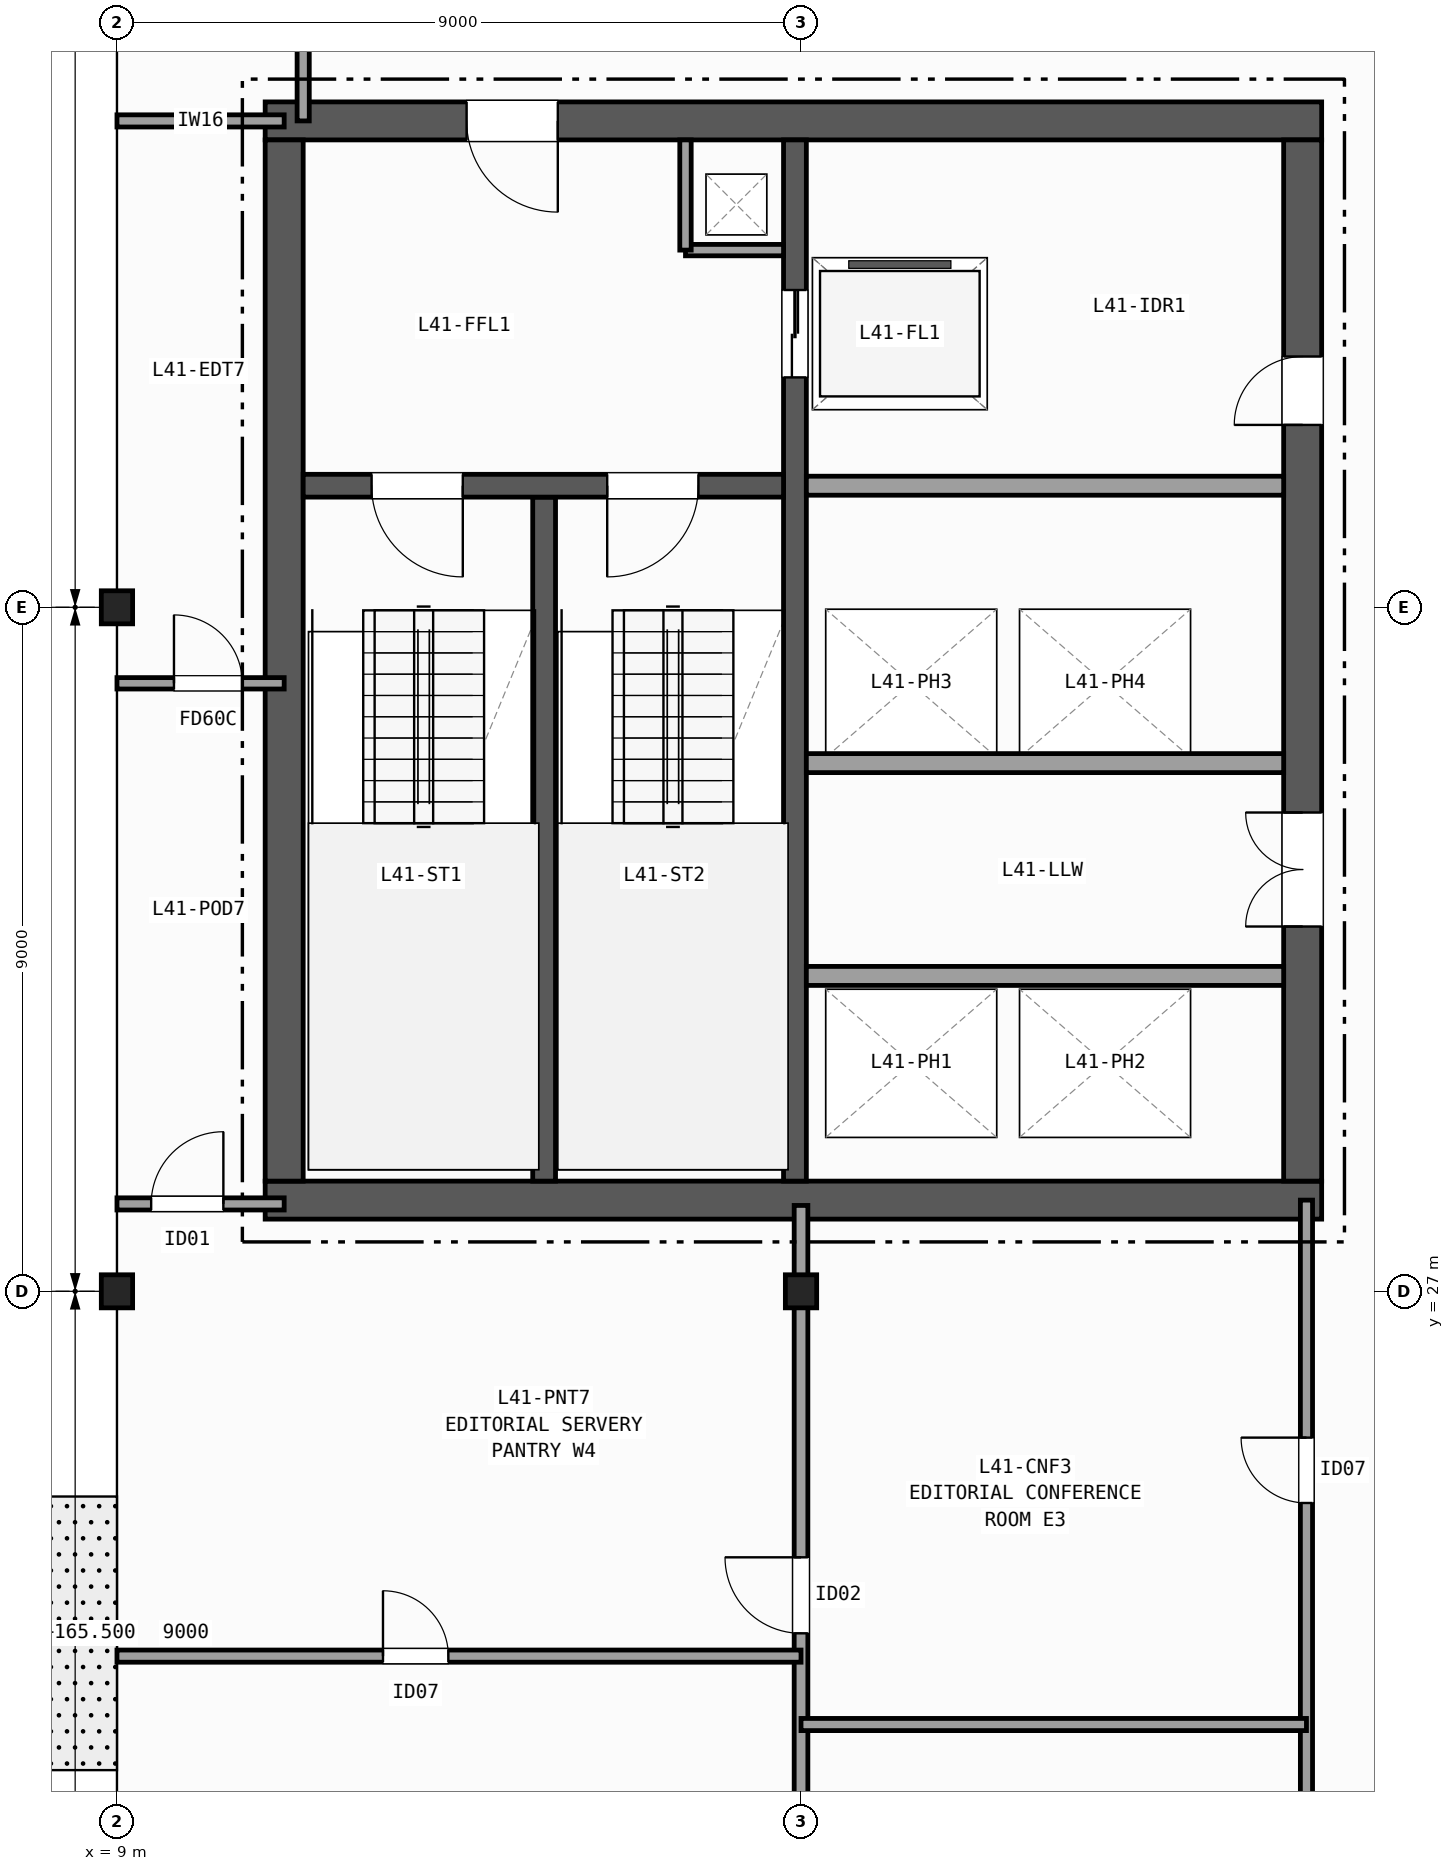
"""IFC4 building model, lengths in metres.
Left out: names, types, materials, properties, quantities, classifications, styles, units other than length and angle.
Written with IfcOpenShell. Run it as: python <this file> out.ifc"""

import sys

from ifc_helpers import new_model, si_unit, direction, frame, frame_2d, origin, origin_2d, place, context, subcontext, project, spatial, rectangle, i_section, extrude, element, fill, save


model = new_model("IFC4")
c1 = context("Model", 3, precision=1e-05, world=origin(), true_north=direction((0.0, 1.0)))
c2 = subcontext(c1, "Body", "Model", "MODEL_VIEW")
j1 = project(units=[si_unit("LENGTHUNIT", "METRE"), si_unit("PLANEANGLEUNIT", "RADIAN")], contexts=[c1])
p1 = place(None, origin())
s1 = spatial("IfcSite", under=j1, at=p1, CompositionType="ELEMENT")
p2 = place(p1, origin())
s2 = spatial("IfcBuilding", under=s1, at=p2, CompositionType="ELEMENT")
p3 = place(p2, frame((0.0, 0.0, 165.5)))
s3 = spatial("IfcBuildingStorey", under=s2, at=p3, CompositionType="ELEMENT", Elevation=165.5)
for number, where, z_axis, x_axis in (
    (1, (9.0, 27.0, 0.0), (0.0, 0.0, 1.0), (1.0, 0.0, 0.0)),
    (2, (9.0, 36.0, 0.0), (0.0, 0.0, 1.0), (1.0, 0.0, 0.0)),
    (3, (18.0, 27.0, 0.0), (0.0, 0.0, 1.0), (1.0, 0.0, 0.0)),
):
    element("IfcColumn", number, at=place(p3, frame(where, z_axis=z_axis, x_axis=x_axis)), inside=s3, PredefinedType="COLUMN", context=c2, shape_type="SweptSolid", body=[
        extrude(i_section(OverallWidth=0.412, OverallDepth=0.435, WebThickness=0.036, FlangeThickness=0.057, FilletRadius=0.015, at=origin_2d()), origin(), (0.0, 0.0, 1.0), 3.7),
    ])
p4 = place(p3, frame((10.95, 28.2, 0.0), z_axis=(0.0, 0.0, 1.0), x_axis=(1.0, 0.0, 0.0)))
e4 = element("IfcWall", 4, at=p4, inside=s3, PredefinedType="SHEAR", context=c2, shape_type="SweptSolid", body=[
    extrude(rectangle(XDim=13.9, YDim=0.5, at=frame_2d((6.95, 0.0))), origin(), (0.0, 0.0, 1.0), 3.37),
])
p5 = place(p3, frame((24.85, 42.4, 0.0), z_axis=(0.0, 0.0, 1.0), x_axis=(-1.0, 0.0, 0.0)))
e5 = element("IfcWall", 5, at=p5, inside=s3, PredefinedType="SHEAR", context=c2, shape_type="SweptSolid", body=[
    extrude(rectangle(XDim=13.9, YDim=0.5, at=frame_2d((6.95, 0.0))), origin(), (0.0, 0.0, 1.0), 3.37),
])
p6 = place(p5, frame((10.05, 0.0, 0.0)))
e6 = element("IfcOpeningElement", 6, at=p6, cuts=e5, PredefinedType="OPENING", context=c2, shape_type="SweptSolid", body=[
    extrude(rectangle(XDim=1.2, YDim=2.15, at=frame_2d((0.6, 1.075))), frame((0.0, 0.26, 0.0), z_axis=(0.0, -1.0, 0.0), x_axis=(1.0, 0.0, 0.0)), (0.0, 0.0, 1.0), 0.52),
])
p7 = place(p3, frame((11.2, 42.15, 0.0), z_axis=(0.0, 0.0, 1.0), x_axis=(0.0, -1.0, 0.0)))
e7 = element("IfcWall", 7, at=p7, inside=s3, PredefinedType="SHEAR", context=c2, shape_type="SweptSolid", body=[
    extrude(rectangle(XDim=13.7, YDim=0.5, at=frame_2d((6.85, 0.0))), origin(), (0.0, 0.0, 1.0), 3.37),
])
p8 = place(p3, frame((24.6, 28.45, 0.0), z_axis=(0.0, 0.0, 1.0), x_axis=(0.0, 1.0, 0.0)))
e8 = element("IfcWall", 8, at=p8, inside=s3, PredefinedType="SHEAR", context=c2, shape_type="SweptSolid", body=[
    extrude(rectangle(XDim=13.7, YDim=0.5, at=frame_2d((6.85, 0.0))), origin(), (0.0, 0.0, 1.0), 3.37),
])
p9 = place(p8, frame((3.35, 0.0, 0.0)))
e9 = element("IfcOpeningElement", 9, at=p9, cuts=e8, PredefinedType="OPENING", context=c2, shape_type="SweptSolid", body=[
    extrude(rectangle(XDim=1.5, YDim=2.2, at=frame_2d((0.75, 1.1))), frame((0.0, 0.26, 0.0), z_axis=(0.0, -1.0, 0.0), x_axis=(1.0, 0.0, 0.0)), (0.0, 0.0, 1.0), 0.52),
])
p10 = place(p8, frame((9.95, 0.0, 0.0)))
e10 = element("IfcOpeningElement", 10, at=p10, cuts=e8, PredefinedType="OPENING", context=c2, shape_type="SweptSolid", body=[
    extrude(rectangle(XDim=0.9, YDim=2.1, at=frame_2d((0.45, 1.05))), frame((0.0, 0.26, 0.0), z_axis=(0.0, -1.0, 0.0), x_axis=(1.0, 0.0, 0.0)), (0.0, 0.0, 1.0), 0.52),
])
p11 = place(p3, frame((14.62, 28.45, 0.0), z_axis=(0.0, 0.0, 1.0), x_axis=(0.0, 1.0, 0.0)))
e11 = element("IfcWall", 11, at=p11, inside=s3, PredefinedType="SHEAR", context=c2, shape_type="SweptSolid", body=[
    extrude(rectangle(XDim=9.0, YDim=0.3, at=frame_2d((4.5, 0.0))), origin(), (0.0, 0.0, 1.0), 3.37),
])
p12 = place(p3, frame((17.92, 42.15, 0.0), z_axis=(0.0, 0.0, 1.0), x_axis=(0.0, -1.0, 0.0)))
e12 = element("IfcWall", 12, at=p12, inside=s3, PredefinedType="SHEAR", context=c2, shape_type="SweptSolid", body=[
    extrude(rectangle(XDim=13.7, YDim=0.3, at=frame_2d((6.85, 0.0))), origin(), (0.0, 0.0, 1.0), 3.37),
])
p13 = place(p12, frame((1.975, 0.0, 0.0)))
e13 = element("IfcOpeningElement", 13, at=p13, cuts=e12, PredefinedType="OPENING", context=c2, shape_type="SweptSolid", body=[
    extrude(rectangle(XDim=1.15, YDim=2.15, at=frame_2d((0.575, 1.075))), frame((0.0, 0.16, 0.0), z_axis=(0.0, -1.0, 0.0), x_axis=(1.0, 0.0, 0.0)), (0.0, 0.0, 1.0), 0.32),
])
p14 = place(p3, frame((17.77, 37.6, 0.0), z_axis=(0.0, 0.0, 1.0), x_axis=(-1.0, 0.0, 0.0)))
e14 = element("IfcWall", 14, at=p14, inside=s3, PredefinedType="SHEAR", context=c2, shape_type="SweptSolid", body=[
    extrude(rectangle(XDim=6.32, YDim=0.3, at=frame_2d((3.16, 0.0))), origin(), (0.0, 0.0, 1.0), 3.37),
])
p15 = place(p14, frame((4.22, 0.0, 0.0)))
e15 = element("IfcOpeningElement", 15, at=p15, cuts=e14, PredefinedType="OPENING", context=c2, shape_type="SweptSolid", body=[
    extrude(rectangle(XDim=1.2, YDim=2.15, at=frame_2d((0.6, 1.075))), frame((0.0, 0.16, 0.0), z_axis=(0.0, -1.0, 0.0), x_axis=(1.0, 0.0, 0.0)), (0.0, 0.0, 1.0), 0.32),
])
p16 = place(p14, frame((1.12, 0.0, 0.0)))
e16 = element("IfcOpeningElement", 16, at=p16, cuts=e14, PredefinedType="OPENING", context=c2, shape_type="SweptSolid", body=[
    extrude(rectangle(XDim=1.2, YDim=2.15, at=frame_2d((0.6, 1.075))), frame((0.0, 0.16, 0.0), z_axis=(0.0, -1.0, 0.0), x_axis=(1.0, 0.0, 0.0)), (0.0, 0.0, 1.0), 0.32),
])
p17 = place(p3, frame((16.48, 40.7, 0.0), z_axis=(0.0, 0.0, 1.0), x_axis=(1.0, 0.0, 0.0)))
e17 = element("IfcWall", 17, at=p17, inside=s3, PredefinedType="PARTITIONING", context=c2, shape_type="SweptSolid", body=[
    extrude(rectangle(XDim=1.29, YDim=0.15, at=frame_2d((0.645, 0.0))), origin(), (0.0, 0.0, 1.0), 3.37),
])
p18 = place(p3, frame((16.48, 40.7, 0.0), z_axis=(0.0, 0.0, 1.0), x_axis=(0.0, 1.0, 0.0)))
e18 = element("IfcWall", 18, at=p18, inside=s3, PredefinedType="PARTITIONING", context=c2, shape_type="SweptSolid", body=[
    extrude(rectangle(XDim=1.45, YDim=0.15, at=frame_2d((0.725, 0.0))), origin(), (0.0, 0.0, 1.0), 3.37),
])
for number, where, z_axis, x_axis in (
    (19, (18.07, 37.6, 0.0), (0.0, 0.0, 1.0), (1.0, 0.0, 0.0)),
    (20, (18.07, 31.15, 0.0), (0.0, 0.0, 1.0), (1.0, 0.0, 0.0)),
    (21, (24.35, 33.95, 0.0), (0.0, 0.0, 1.0), (-1.0, 0.0, 0.0)),
):
    element("IfcWall", number, at=place(p3, frame(where, z_axis=z_axis, x_axis=x_axis)), inside=s3, PredefinedType="PARTITIONING", context=c2, shape_type="SweptSolid", body=[
        extrude(rectangle(XDim=6.28, YDim=0.25, at=frame_2d((3.14, 0.0))), origin(), (0.0, 0.0, 1.0), 3.37),
    ])
p19 = place(p3, frame((9.0, 28.15, 0.0), z_axis=(0.0, 0.0, 1.0), x_axis=(1.0, 0.0, 0.0)))
e22 = element("IfcWall", 22, at=p19, inside=s3, PredefinedType="PARTITIONING", context=c2, shape_type="SweptSolid", body=[
    extrude(rectangle(XDim=2.2, YDim=0.16, at=frame_2d((1.1, 0.0))), origin(), (0.0, 0.0, 1.0), 2.584),
])
p20 = place(p19, frame((0.45, 0.0, 0.0)))
e23 = element("IfcOpeningElement", 23, at=p20, cuts=e22, PredefinedType="OPENING", context=c2, shape_type="SweptSolid", body=[
    extrude(rectangle(XDim=0.95, YDim=2.1, at=frame_2d((0.475, 1.05))), frame((0.0, 0.09, 0.0), z_axis=(0.0, -1.0, 0.0), x_axis=(1.0, 0.0, 0.0)), (0.0, 0.0, 1.0), 0.18),
])
p21 = place(p3, frame((9.0, 42.4, 0.0), z_axis=(0.0, 0.0, 1.0), x_axis=(1.0, 0.0, 0.0)))
e24 = element("IfcWall", 24, at=p21, inside=s3, PredefinedType="PARTITIONING", context=c2, shape_type="SweptSolid", body=[
    extrude(rectangle(XDim=2.2, YDim=0.16, at=frame_2d((1.1, 0.0))), origin(), (0.0, 0.0, 1.0), 2.584),
])
p22 = place(p3, frame((11.45, 42.4, 0.0), z_axis=(0.0, 0.0, 1.0), x_axis=(0.0, 1.0, 0.0)))
e25 = element("IfcWall", 25, at=p22, inside=s3, PredefinedType="PARTITIONING", context=c2, shape_type="SweptSolid", body=[
    extrude(rectangle(XDim=2.1, YDim=0.16, at=frame_2d((1.05, 0.0))), origin(), (0.0, 0.0, 1.0), 3.37),
])
p23 = place(p3, frame((9.0, 35.0, 0.0), z_axis=(0.0, 0.0, 1.0), x_axis=(1.0, 0.0, 0.0)))
e26 = element("IfcWall", 26, at=p23, inside=s3, PredefinedType="PARTITIONING", context=c2, shape_type="SweptSolid", body=[
    extrude(rectangle(XDim=2.2, YDim=0.15, at=frame_2d((1.1, 0.0))), origin(), (0.0, 0.0, 1.0), 2.584),
])
p24 = place(p23, frame((0.75, 0.0, 0.0)))
e27 = element("IfcOpeningElement", 27, at=p24, cuts=e26, PredefinedType="OPENING", context=c2, shape_type="SweptSolid", body=[
    extrude(rectangle(XDim=0.9, YDim=2.1, at=frame_2d((0.45, 1.05))), frame((0.0, 0.085, 0.0), z_axis=(0.0, -1.0, 0.0), x_axis=(1.0, 0.0, 0.0)), (0.0, 0.0, 1.0), 0.17),
])
p25 = place(p3, frame((24.65, 9.0, 0.0), z_axis=(0.0, 0.0, 1.0), x_axis=(0.0, 1.0, 0.0)))
e28 = element("IfcWall", 28, at=p25, inside=s3, PredefinedType="PARTITIONING", context=c2, shape_type="SweptSolid", body=[
    extrude(rectangle(XDim=19.2, YDim=0.16, at=frame_2d((9.6, 0.0))), origin(), (0.0, 0.0, 1.0), 2.584),
])
p26 = place(p25, frame((2.4, 0.0, 0.0)))
e29 = element("IfcOpeningElement", 29, at=p26, cuts=e28, PredefinedType="OPENING", context=c2, shape_type="SweptSolid", body=[
    extrude(rectangle(XDim=1.05, YDim=2.15, at=frame_2d((0.525, 1.075))), frame((0.0, 0.09, 0.0), z_axis=(0.0, -1.0, 0.0), x_axis=(1.0, 0.0, 0.0)), (0.0, 0.0, 1.0), 0.18),
])
p27 = place(p25, frame((8.55, 0.0, 0.0)))
e30 = element("IfcOpeningElement", 30, at=p27, cuts=e28, PredefinedType="OPENING", context=c2, shape_type="SweptSolid", body=[
    extrude(rectangle(XDim=1.2, YDim=2.15, at=frame_2d((0.6, 1.075))), frame((0.0, 0.09, 0.0), z_axis=(0.0, -1.0, 0.0), x_axis=(1.0, 0.0, 0.0)), (0.0, 0.0, 1.0), 0.18),
])
p28 = place(p25, frame((15.215, 0.0, 0.0)))
e31 = element("IfcOpeningElement", 31, at=p28, cuts=e28, PredefinedType="OPENING", context=c2, shape_type="SweptSolid", body=[
    extrude(rectangle(XDim=0.86, YDim=2.05, at=frame_2d((0.43, 1.025))), frame((0.0, 0.09, 0.0), z_axis=(0.0, -1.0, 0.0), x_axis=(1.0, 0.0, 0.0)), (0.0, 0.0, 1.0), 0.18),
])
p29 = place(p3, frame((18.0, 9.0, 0.0), z_axis=(0.0, 0.0, 1.0), x_axis=(0.0, 1.0, 0.0)))
e32 = element("IfcWall", 32, at=p29, inside=s3, PredefinedType="PARTITIONING", context=c2, shape_type="SweptSolid", body=[
    extrude(rectangle(XDim=19.13, YDim=0.18, at=frame_2d((9.565, 0.0))), origin(), (0.0, 0.0, 1.0), 2.584),
])
p30 = place(p29, frame((2.2, 0.0, 0.0)))
e33 = element("IfcOpeningElement", 33, at=p30, cuts=e32, PredefinedType="OPENING", context=c2, shape_type="SweptSolid", body=[
    extrude(rectangle(XDim=0.95, YDim=2.1, at=frame_2d((0.475, 1.05))), frame((0.0, 0.1, 0.0), z_axis=(0.0, -1.0, 0.0), x_axis=(1.0, 0.0, 0.0)), (0.0, 0.0, 1.0), 0.2),
])
p31 = place(p29, frame((13.5, 0.0, 0.0)))
e34 = element("IfcOpeningElement", 34, at=p31, cuts=e32, PredefinedType="OPENING", context=c2, shape_type="SweptSolid", body=[
    extrude(rectangle(XDim=1.0, YDim=2.1, at=frame_2d((0.5, 1.05))), frame((0.0, 0.1, 0.0), z_axis=(0.0, -1.0, 0.0), x_axis=(1.0, 0.0, 0.0)), (0.0, 0.0, 1.0), 0.2),
])
p32 = place(p3, frame((18.0, 21.3, 0.0), z_axis=(0.0, 0.0, 1.0), x_axis=(1.0, 0.0, 0.0)))
e35 = element("IfcWall", 35, at=p32, inside=s3, PredefinedType="PARTITIONING", context=c2, shape_type="SweptSolid", body=[
    extrude(rectangle(XDim=6.65, YDim=0.16, at=frame_2d((3.325, 0.0))), origin(), (0.0, 0.0, 1.0), 2.742),
])
p33 = place(p3, frame((9.0, 22.2, 0.0), z_axis=(0.0, 0.0, 1.0), x_axis=(1.0, 0.0, 0.0)))
e36 = element("IfcWall", 36, at=p33, inside=s3, PredefinedType="PARTITIONING", context=c2, shape_type="SweptSolid", body=[
    extrude(rectangle(XDim=9.0, YDim=0.16, at=frame_2d((4.5, 0.0))), origin(), (0.0, 0.0, 1.0), 2.584),
])
p34 = place(p33, frame((3.5, 0.0, 0.0)))
e37 = element("IfcOpeningElement", 37, at=p34, cuts=e36, PredefinedType="OPENING", context=c2, shape_type="SweptSolid", body=[
    extrude(rectangle(XDim=0.86, YDim=2.05, at=frame_2d((0.43, 1.025))), frame((0.0, 0.09, 0.0), z_axis=(0.0, -1.0, 0.0), x_axis=(1.0, 0.0, 0.0)), (0.0, 0.0, 1.0), 0.18),
])
p35 = place(p15, origin())
e38 = element("IfcDoor", 38, at=p35, inside=s3, OperationType="SINGLE_SWING_LEFT", PredefinedType="DOOR", context=c2, shape_type="SweptSolid", body=[
    extrude(rectangle(XDim=1.2, YDim=2.15, at=frame_2d((0.6, 1.075))), frame((0.0, 0.025, 0.0), z_axis=(0.0, -1.0, 0.0), x_axis=(1.0, 0.0, 0.0)), (0.0, 0.0, 1.0), 0.05),
])
fill(e15, e38)
p36 = place(p16, origin())
e39 = element("IfcDoor", 39, at=p36, inside=s3, OperationType="SINGLE_SWING_RIGHT", PredefinedType="DOOR", context=c2, shape_type="SweptSolid", body=[
    extrude(rectangle(XDim=1.2, YDim=2.15, at=frame_2d((0.6, 1.075))), frame((0.0, 0.025, 0.0), z_axis=(0.0, -1.0, 0.0), x_axis=(1.0, 0.0, 0.0)), (0.0, 0.0, 1.0), 0.05),
])
fill(e16, e39)
p37 = place(p9, origin())
e40 = element("IfcDoor", 40, at=p37, inside=s3, OperationType="DOUBLE_DOOR_SINGLE_SWING", PredefinedType="DOOR", context=c2, shape_type="SweptSolid", body=[
    extrude(rectangle(XDim=1.5, YDim=2.2, at=frame_2d((0.75, 1.1))), frame((0.0, 0.025, 0.0), z_axis=(0.0, -1.0, 0.0), x_axis=(1.0, 0.0, 0.0)), (0.0, 0.0, 1.0), 0.05),
])
fill(e9, e40)
p38 = place(p6, origin())
e41 = element("IfcDoor", 41, at=p38, inside=s3, OperationType="SINGLE_SWING_LEFT", PredefinedType="DOOR", context=c2, shape_type="SweptSolid", body=[
    extrude(rectangle(XDim=1.2, YDim=2.15, at=frame_2d((0.6, 1.075))), frame((0.0, 0.025, 0.0), z_axis=(0.0, -1.0, 0.0), x_axis=(1.0, 0.0, 0.0)), (0.0, 0.0, 1.0), 0.05),
])
fill(e6, e41)
p39 = place(p10, origin())
e42 = element("IfcDoor", 42, at=p39, inside=s3, OperationType="SINGLE_SWING_LEFT", PredefinedType="DOOR", context=c2, shape_type="SweptSolid", body=[
    extrude(rectangle(XDim=0.9, YDim=2.1, at=frame_2d((0.45, 1.05))), frame((0.0, 0.025, 0.0), z_axis=(0.0, -1.0, 0.0), x_axis=(1.0, 0.0, 0.0)), (0.0, 0.0, 1.0), 0.05),
])
fill(e10, e42)
p40 = place(p13, origin())
e43 = element("IfcDoor", 43, at=p40, inside=s3, OperationType="DOUBLE_DOOR_SLIDING", PredefinedType="DOOR", context=c2, shape_type="SweptSolid", body=[
    extrude(rectangle(XDim=1.15, YDim=2.15, at=frame_2d((0.575, 1.075))), frame((0.0, 0.025, 0.0), z_axis=(0.0, -1.0, 0.0), x_axis=(1.0, 0.0, 0.0)), (0.0, 0.0, 1.0), 0.05),
])
fill(e13, e43)
p41 = place(p20, origin())
e44 = element("IfcDoor", 44, at=p41, inside=s3, OperationType="SINGLE_SWING_RIGHT", PredefinedType="DOOR", context=c2, shape_type="SweptSolid", body=[
    extrude(rectangle(XDim=0.95, YDim=2.1, at=frame_2d((0.475, 1.05))), frame((0.0, 0.025, 0.0), z_axis=(0.0, -1.0, 0.0), x_axis=(1.0, 0.0, 0.0)), (0.0, 0.0, 1.0), 0.05),
])
fill(e23, e44)
p42 = place(p24, origin())
e45 = element("IfcDoor", 45, at=p42, inside=s3, OperationType="SINGLE_SWING_LEFT", PredefinedType="DOOR", context=c2, shape_type="SweptSolid", body=[
    extrude(rectangle(XDim=0.9, YDim=2.1, at=frame_2d((0.45, 1.05))), frame((0.0, 0.025, 0.0), z_axis=(0.0, -1.0, 0.0), x_axis=(1.0, 0.0, 0.0)), (0.0, 0.0, 1.0), 0.05),
])
fill(e27, e45)
p43 = place(p28, origin())
e46 = element("IfcDoor", 46, at=p43, inside=s3, OperationType="SINGLE_SWING_RIGHT", PredefinedType="DOOR", context=c2, shape_type="SweptSolid", body=[
    extrude(rectangle(XDim=0.86, YDim=2.05, at=frame_2d((0.43, 1.025))), frame((0.0, 0.025, 0.0), z_axis=(0.0, -1.0, 0.0), x_axis=(1.0, 0.0, 0.0)), (0.0, 0.0, 1.0), 0.05),
])
fill(e31, e46)
p44 = place(p31, origin())
e47 = element("IfcDoor", 47, at=p44, inside=s3, OperationType="SINGLE_SWING_RIGHT", PredefinedType="DOOR", context=c2, shape_type="SweptSolid", body=[
    extrude(rectangle(XDim=1.0, YDim=2.1, at=frame_2d((0.5, 1.05))), frame((0.0, 0.025, 0.0), z_axis=(0.0, -1.0, 0.0), x_axis=(1.0, 0.0, 0.0)), (0.0, 0.0, 1.0), 0.05),
])
fill(e34, e47)
p45 = place(p34, origin())
e48 = element("IfcDoor", 48, at=p45, inside=s3, OperationType="SINGLE_SWING_LEFT", PredefinedType="DOOR", context=c2, shape_type="SweptSolid", body=[
    extrude(rectangle(XDim=0.86, YDim=2.05, at=frame_2d((0.43, 1.025))), frame((0.0, 0.025, 0.0), z_axis=(0.0, -1.0, 0.0), x_axis=(1.0, 0.0, 0.0)), (0.0, 0.0, 1.0), 0.05),
])
fill(e37, e48)
save(model, sys.argv[1])
